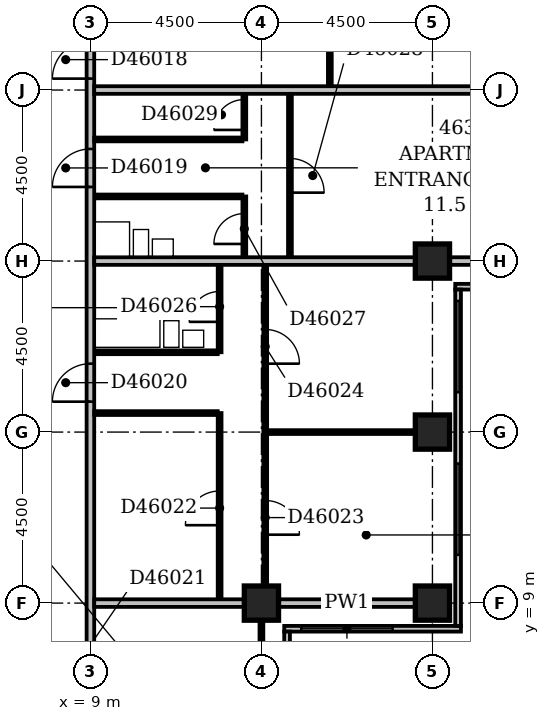
"""IFC4 building model, lengths in metres.
Left out: names, types, materials, properties, quantities, classifications, styles, units other than length and angle.
Written with IfcOpenShell. Run it as: python <this file> out.ifc"""

import sys

from ifc_helpers import new_model, si_unit, direction, frame, frame_2d, origin, origin_2d, place, context, subcontext, project, spatial, rectangle, extrude, element, fill, save


model = new_model("IFC4")
c1 = context("Model", 3, precision=1e-05, world=origin(), true_north=direction((0.0, 1.0)))
c2 = subcontext(c1, "Body", "Model", "MODEL_VIEW")
j1 = project(units=[si_unit("LENGTHUNIT", "METRE"), si_unit("PLANEANGLEUNIT", "RADIAN")], contexts=[c1])
p1 = place(None, origin())
s1 = spatial("IfcSite", under=j1, at=p1, CompositionType="ELEMENT")
p2 = place(p1, origin())
s2 = spatial("IfcBuilding", under=s1, at=p2, CompositionType="ELEMENT")
p3 = place(p2, frame((0.0, 0.0, 182.6)))
s3 = spatial("IfcBuildingStorey", under=s2, at=p3, CompositionType="ELEMENT", Elevation=182.6)
for number, where, z_axis, x_axis in (
    (1, (13.5, 9.0, -0.3), (0.0, 0.0, 1.0), (1.0, 0.0, 0.0)),
    (2, (18.0, 9.0, -0.3), (0.0, 0.0, 1.0), (1.0, 0.0, 0.0)),
    (3, (18.0, 13.5, -0.3), (0.0, 0.0, 1.0), (1.0, 0.0, 0.0)),
    (4, (18.0, 18.0, -0.3), (0.0, 0.0, 1.0), (1.0, 0.0, 0.0)),
):
    element("IfcColumn", number, at=place(p3, frame(where, z_axis=z_axis, x_axis=x_axis)), inside=s3, PredefinedType="COLUMN", context=c2, shape_type="SweptSolid", body=[
        extrude(rectangle(XDim=0.9, YDim=0.9, at=origin_2d()), origin(), (0.0, 0.0, 1.0), 3.55),
    ])
p4 = place(p3, frame((14.175, 3.9, 0.0), z_axis=(0.0, 0.0, 1.0), x_axis=(0.0, 1.0, 0.0)))
e5 = element("IfcWall", 5, at=p4, inside=s3, PredefinedType="STANDARD", context=c2, shape_type="SweptSolid", body=[
    extrude(rectangle(XDim=4.35, YDim=0.15, at=frame_2d((2.175, 0.0))), origin(), (0.0, 0.0, 1.0), 2.7),
])
p5 = place(p4, frame((1.65, 0.0, 0.6)))
e6 = element("IfcOpeningElement", 6, at=p5, cuts=e5, PredefinedType="OPENING", context=c2, shape_type="SweptSolid", body=[
    extrude(rectangle(XDim=2.4, YDim=1.8, at=frame_2d((1.2, 0.9))), frame((0.0, 0.087, 0.0), z_axis=(0.0, -1.0, 0.0), x_axis=(1.0, 0.0, 0.0)), (0.0, 0.0, 1.0), 0.174),
])
p6 = place(p3, frame((14.1, 8.325, 0.0), z_axis=(0.0, 0.0, 1.0), x_axis=(1.0, 0.0, 0.0)))
e7 = element("IfcWall", 7, at=p6, inside=s3, PredefinedType="STANDARD", context=c2, shape_type="SweptSolid", body=[
    extrude(rectangle(XDim=4.65, YDim=0.15, at=frame_2d((2.325, 0.0))), origin(), (0.0, 0.0, 1.0), 2.7),
])
p7 = place(p6, frame((0.45, 0.0, 0.6)))
e8 = element("IfcOpeningElement", 8, at=p7, cuts=e7, PredefinedType="OPENING", context=c2, shape_type="SweptSolid", body=[
    extrude(rectangle(XDim=2.4, YDim=1.8, at=frame_2d((1.2, 0.9))), frame((0.0, 0.087, 0.0), z_axis=(0.0, -1.0, 0.0), x_axis=(1.0, 0.0, 0.0)), (0.0, 0.0, 1.0), 0.174),
])
p8 = place(p3, frame((18.675, 8.4, 0.0), z_axis=(0.0, 0.0, 1.0), x_axis=(0.0, 1.0, 0.0)))
e9 = element("IfcWall", 9, at=p8, inside=s3, PredefinedType="STANDARD", context=c2, shape_type="SweptSolid", body=[
    extrude(rectangle(XDim=8.85, YDim=0.15, at=frame_2d((4.425, 0.0))), origin(), (0.0, 0.0, 1.0), 2.7),
])
p9 = place(p8, frame((1.871, 0.0, 0.6)))
e10 = element("IfcOpeningElement", 10, at=p9, cuts=e9, PredefinedType="OPENING", context=c2, shape_type="SweptSolid", body=[
    extrude(rectangle(XDim=2.4, YDim=1.8, at=frame_2d((1.2, 0.9))), frame((0.0, 0.087, 0.0), z_axis=(0.0, -1.0, 0.0), x_axis=(1.0, 0.0, 0.0)), (0.0, 0.0, 1.0), 0.174),
])
p10 = place(p8, frame((6.15, 0.0, 0.6)))
e11 = element("IfcOpeningElement", 11, at=p10, cuts=e9, PredefinedType="OPENING", context=c2, shape_type="SweptSolid", body=[
    extrude(rectangle(XDim=2.4, YDim=1.8, at=frame_2d((1.2, 0.9))), frame((0.0, 0.087, 0.0), z_axis=(0.0, -1.0, 0.0), x_axis=(1.0, 0.0, 0.0)), (0.0, 0.0, 1.0), 0.174),
])
p11 = place(p3, frame((18.6, 17.325, 0.0), z_axis=(0.0, 0.0, 1.0), x_axis=(1.0, 0.0, 0.0)))
e12 = element("IfcWall", 12, at=p11, inside=s3, PredefinedType="STANDARD", context=c2, shape_type="SweptSolid", body=[
    extrude(rectangle(XDim=4.65, YDim=0.15, at=frame_2d((2.325, 0.0))), origin(), (0.0, 0.0, 1.0), 2.7),
])
p12 = place(p11, frame((0.45, 0.0, 0.6)))
e13 = element("IfcOpeningElement", 13, at=p12, cuts=e12, PredefinedType="OPENING", context=c2, shape_type="SweptSolid", body=[
    extrude(rectangle(XDim=2.4, YDim=1.8, at=frame_2d((1.2, 0.9))), frame((0.0, 0.087, 0.0), z_axis=(0.0, -1.0, 0.0), x_axis=(1.0, 0.0, 0.0)), (0.0, 0.0, 1.0), 0.174),
])
p13 = place(p3, frame((13.5, 4.95, 0.0), z_axis=(0.0, 0.0, 1.0), x_axis=(0.0, 1.0, 0.0)))
e14 = element("IfcWall", 14, at=p13, inside=s3, PredefinedType="PARTITIONING", context=c2, shape_type="SweptSolid", body=[
    extrude(rectangle(XDim=3.6, YDim=0.1, at=frame_2d((1.8, 0.0))), origin(), (0.0, 0.0, 1.0), 2.7),
])
p14 = place(p3, frame((9.0, 5.0, 0.0), z_axis=(0.0, 0.0, 1.0), x_axis=(0.0, 1.0, 0.0)))
e15 = element("IfcWall", 15, at=p14, inside=s3, PredefinedType="PARTITIONING", context=c2, shape_type="SweptSolid", body=[
    extrude(rectangle(XDim=31.0, YDim=0.2, at=frame_2d((15.5, 0.0))), origin(), (0.0, 0.0, 1.0), 3.25),
])
p15 = place(p14, frame((17.8, 0.0, 0.0)))
e16 = element("IfcOpeningElement", 16, at=p15, cuts=e15, PredefinedType="OPENING", context=c2, shape_type="SweptSolid", body=[
    extrude(rectangle(XDim=1.0, YDim=2.1, at=frame_2d((0.5, 1.05))), frame((0.0, 0.112, 0.0), z_axis=(0.0, -1.0, 0.0), x_axis=(1.0, 0.0, 0.0)), (0.0, 0.0, 1.0), 0.224),
])
p16 = place(p14, frame((14.95, 0.0, 0.0)))
e17 = element("IfcOpeningElement", 17, at=p16, cuts=e15, PredefinedType="OPENING", context=c2, shape_type="SweptSolid", body=[
    extrude(rectangle(XDim=1.0, YDim=2.1, at=frame_2d((0.5, 1.05))), frame((0.0, 0.112, 0.0), z_axis=(0.0, -1.0, 0.0), x_axis=(1.0, 0.0, 0.0)), (0.0, 0.0, 1.0), 0.224),
])
p17 = place(p14, frame((9.3, 0.0, 0.0)))
e18 = element("IfcOpeningElement", 18, at=p17, cuts=e15, PredefinedType="OPENING", context=c2, shape_type="SweptSolid", body=[
    extrude(rectangle(XDim=1.0, YDim=2.1, at=frame_2d((0.5, 1.05))), frame((0.0, 0.112, 0.0), z_axis=(0.0, -1.0, 0.0), x_axis=(1.0, 0.0, 0.0)), (0.0, 0.0, 1.0), 0.224),
])
p18 = place(p14, frame((1.5, 0.0, 0.0)))
e19 = element("IfcOpeningElement", 19, at=p18, cuts=e15, PredefinedType="OPENING", context=c2, shape_type="SweptSolid", body=[
    extrude(rectangle(XDim=0.9, YDim=2.1, at=frame_2d((0.45, 1.05))), frame((0.0, 0.112, 0.0), z_axis=(0.0, -1.0, 0.0), x_axis=(1.0, 0.0, 0.0)), (0.0, 0.0, 1.0), 0.224),
])
p19 = place(p3, frame((9.1, 9.0, 0.0), z_axis=(0.0, 0.0, 1.0), x_axis=(1.0, 0.0, 0.0)))
e20 = element("IfcWall", 20, at=p19, inside=s3, PredefinedType="PARTITIONING", context=c2, shape_type="SweptSolid", body=[
    extrude(rectangle(XDim=3.95, YDim=0.2, at=frame_2d((1.975, 0.0))), origin(), (0.0, 0.0, 1.0), 3.25),
])
p20 = place(p3, frame((13.95, 9.0, 0.0), z_axis=(0.0, 0.0, 1.0), x_axis=(1.0, 0.0, 0.0)))
e21 = element("IfcWall", 21, at=p20, inside=s3, PredefinedType="PARTITIONING", context=c2, shape_type="SweptSolid", body=[
    extrude(rectangle(XDim=3.6, YDim=0.2, at=frame_2d((1.8, 0.0))), origin(), (0.0, 0.0, 1.0), 2.7),
])
p21 = place(p3, frame((12.4, 9.1, 0.0), z_axis=(0.0, 0.0, 1.0), x_axis=(0.0, 1.0, 0.0)))
e22 = element("IfcWall", 22, at=p21, inside=s3, PredefinedType="PARTITIONING", context=c2, shape_type="SweptSolid", body=[
    extrude(rectangle(XDim=4.9, YDim=0.1, at=frame_2d((2.45, 0.0))), origin(), (0.0, 0.0, 1.0), 3.25),
])
p22 = place(p21, frame((1.95, 0.0, 0.0)))
e23 = element("IfcOpeningElement", 23, at=p22, cuts=e22, PredefinedType="OPENING", context=c2, shape_type="SweptSolid", body=[
    extrude(rectangle(XDim=0.9, YDim=2.1, at=frame_2d((0.45, 1.05))), frame((0.0, 0.062, 0.0), z_axis=(0.0, -1.0, 0.0), x_axis=(1.0, 0.0, 0.0)), (0.0, 0.0, 1.0), 0.124),
])
p23 = place(p3, frame((13.6, 9.45, 0.0), z_axis=(0.0, 0.0, 1.0), x_axis=(0.0, 1.0, 0.0)))
e24 = element("IfcWall", 24, at=p23, inside=s3, PredefinedType="PARTITIONING", context=c2, shape_type="SweptSolid", body=[
    extrude(rectangle(XDim=8.45, YDim=0.1, at=frame_2d((4.225, 0.0))), origin(), (0.0, 0.0, 1.0), 3.25),
])
p24 = place(p23, frame((1.35, 0.0, 0.0)))
e25 = element("IfcOpeningElement", 25, at=p24, cuts=e24, PredefinedType="OPENING", context=c2, shape_type="SweptSolid", body=[
    extrude(rectangle(XDim=0.9, YDim=2.1, at=frame_2d((0.45, 1.05))), frame((0.0, 0.062, 0.0), z_axis=(0.0, -1.0, 0.0), x_axis=(1.0, 0.0, 0.0)), (0.0, 0.0, 1.0), 0.124),
])
p25 = place(p23, frame((5.85, 0.0, 0.0)))
e26 = element("IfcOpeningElement", 26, at=p25, cuts=e24, PredefinedType="OPENING", context=c2, shape_type="SweptSolid", body=[
    extrude(rectangle(XDim=0.9, YDim=2.1, at=frame_2d((0.45, 1.05))), frame((0.0, 0.062, 0.0), z_axis=(0.0, -1.0, 0.0), x_axis=(1.0, 0.0, 0.0)), (0.0, 0.0, 1.0), 0.124),
])
p26 = place(p3, frame((13.65, 13.5, 0.0), z_axis=(0.0, 0.0, 1.0), x_axis=(1.0, 0.0, 0.0)))
e27 = element("IfcWall", 27, at=p26, inside=s3, PredefinedType="PARTITIONING", context=c2, shape_type="SweptSolid", body=[
    extrude(rectangle(XDim=3.9, YDim=0.1, at=frame_2d((1.95, 0.0))), origin(), (0.0, 0.0, 1.0), 3.25),
])
p27 = place(p3, frame((9.1, 14.0, 0.0), z_axis=(0.0, 0.0, 1.0), x_axis=(1.0, 0.0, 0.0)))
e28 = element("IfcWall", 28, at=p27, inside=s3, PredefinedType="PARTITIONING", context=c2, shape_type="SweptSolid", body=[
    extrude(rectangle(XDim=3.25, YDim=0.1, at=frame_2d((1.625, 0.0))), origin(), (0.0, 0.0, 1.0), 3.25),
])
p28 = place(p3, frame((9.1, 15.6, 0.0), z_axis=(0.0, 0.0, 1.0), x_axis=(1.0, 0.0, 0.0)))
e29 = element("IfcWall", 29, at=p28, inside=s3, PredefinedType="PLUMBINGWALL", context=c2, shape_type="SweptSolid", body=[
    extrude(rectangle(XDim=3.25, YDim=0.1, at=frame_2d((1.625, 0.0))), origin(), (0.0, 0.0, 1.0), 3.25),
])
p29 = place(p3, frame((12.4, 15.6, 0.0), z_axis=(0.0, 0.0, 1.0), x_axis=(0.0, 1.0, 0.0)))
e30 = element("IfcWall", 30, at=p29, inside=s3, PredefinedType="PARTITIONING", context=c2, shape_type="SweptSolid", body=[
    extrude(rectangle(XDim=2.3, YDim=0.1, at=frame_2d((1.15, 0.0))), origin(), (0.0, 0.0, 1.0), 3.25),
])
p30 = place(p29, frame((0.8, 0.0, 0.0)))
e31 = element("IfcOpeningElement", 31, at=p30, cuts=e30, PredefinedType="OPENING", context=c2, shape_type="SweptSolid", body=[
    extrude(rectangle(XDim=0.8, YDim=2.1, at=frame_2d((0.4, 1.05))), frame((0.0, 0.062, 0.0), z_axis=(0.0, -1.0, 0.0), x_axis=(1.0, 0.0, 0.0)), (0.0, 0.0, 1.0), 0.124),
])
p31 = place(p3, frame((9.1, 18.0, 0.0), z_axis=(0.0, 0.0, 1.0), x_axis=(1.0, 0.0, 0.0)))
e32 = element("IfcWall", 32, at=p31, inside=s3, PredefinedType="PARTITIONING", context=c2, shape_type="SweptSolid", body=[
    extrude(rectangle(XDim=8.45, YDim=0.2, at=frame_2d((4.225, 0.0))), origin(), (0.0, 0.0, 1.0), 2.55),
])
p32 = place(p3, frame((18.45, 18.0, 0.0), z_axis=(0.0, 0.0, 1.0), x_axis=(1.0, 0.0, 0.0)))
e33 = element("IfcWall", 33, at=p32, inside=s3, PredefinedType="PARTITIONING", context=c2, shape_type="SweptSolid", body=[
    extrude(rectangle(XDim=3.6, YDim=0.2, at=frame_2d((1.8, 0.0))), origin(), (0.0, 0.0, 1.0), 2.7),
])
p33 = place(p3, frame((13.05, 18.1, 0.0), z_axis=(0.0, 0.0, 1.0), x_axis=(0.0, 1.0, 0.0)))
e34 = element("IfcWall", 34, at=p33, inside=s3, PredefinedType="PARTITIONING", context=c2, shape_type="SweptSolid", body=[
    extrude(rectangle(XDim=1.6, YDim=0.1, at=frame_2d((0.8, 0.0))), origin(), (0.0, 0.0, 1.0), 3.25),
])
p34 = place(p33, frame((0.35, 0.0, 0.0)))
e35 = element("IfcOpeningElement", 35, at=p34, cuts=e34, PredefinedType="OPENING", context=c2, shape_type="SweptSolid", body=[
    extrude(rectangle(XDim=0.8, YDim=2.1, at=frame_2d((0.4, 1.05))), frame((0.0, 0.062, 0.0), z_axis=(0.0, -1.0, 0.0), x_axis=(1.0, 0.0, 0.0)), (0.0, 0.0, 1.0), 0.124),
])
p35 = place(p3, frame((14.25, 18.1, 0.0), z_axis=(0.0, 0.0, 1.0), x_axis=(0.0, 1.0, 0.0)))
e36 = element("IfcWall", 36, at=p35, inside=s3, PredefinedType="PARTITIONING", context=c2, shape_type="SweptSolid", body=[
    extrude(rectangle(XDim=4.3, YDim=0.1, at=frame_2d((2.15, 0.0))), origin(), (0.0, 0.0, 1.0), 3.25),
])
p36 = place(p35, frame((1.7, 0.0, 0.0)))
e37 = element("IfcOpeningElement", 37, at=p36, cuts=e36, PredefinedType="OPENING", context=c2, shape_type="SweptSolid", body=[
    extrude(rectangle(XDim=0.9, YDim=2.1, at=frame_2d((0.45, 1.05))), frame((0.0, 0.062, 0.0), z_axis=(0.0, -1.0, 0.0), x_axis=(1.0, 0.0, 0.0)), (0.0, 0.0, 1.0), 0.124),
])
p37 = place(p3, frame((9.1, 19.7, 0.0), z_axis=(0.0, 0.0, 1.0), x_axis=(1.0, 0.0, 0.0)))
e38 = element("IfcWall", 38, at=p37, inside=s3, PredefinedType="PLUMBINGWALL", context=c2, shape_type="SweptSolid", body=[
    extrude(rectangle(XDim=3.9, YDim=0.1, at=frame_2d((1.95, 0.0))), origin(), (0.0, 0.0, 1.0), 3.25),
])
p38 = place(p3, frame((9.1, 21.2, 0.0), z_axis=(0.0, 0.0, 1.0), x_axis=(1.0, 0.0, 0.0)))
e39 = element("IfcWall", 39, at=p38, inside=s3, PredefinedType="PARTITIONING", context=c2, shape_type="SweptSolid", body=[
    extrude(rectangle(XDim=3.9, YDim=0.1, at=frame_2d((1.95, 0.0))), origin(), (0.0, 0.0, 1.0), 3.25),
])
p39 = place(p3, frame((13.05, 21.2, 0.0), z_axis=(0.0, 0.0, 1.0), x_axis=(0.0, 1.0, 0.0)))
e40 = element("IfcWall", 40, at=p39, inside=s3, PredefinedType="PARTITIONING", context=c2, shape_type="SweptSolid", body=[
    extrude(rectangle(XDim=1.2, YDim=0.1, at=frame_2d((0.6, 0.0))), origin(), (0.0, 0.0, 1.0), 3.25),
])
p40 = place(p39, frame((0.25, 0.0, 0.0)))
e41 = element("IfcOpeningElement", 41, at=p40, cuts=e40, PredefinedType="OPENING", context=c2, shape_type="SweptSolid", body=[
    extrude(rectangle(XDim=0.8, YDim=2.1, at=frame_2d((0.4, 1.05))), frame((0.0, 0.062, 0.0), z_axis=(0.0, -1.0, 0.0), x_axis=(1.0, 0.0, 0.0)), (0.0, 0.0, 1.0), 0.124),
])
p41 = place(p3, frame((9.1, 22.5, 0.0), z_axis=(0.0, 0.0, 1.0), x_axis=(1.0, 0.0, 0.0)))
e42 = element("IfcWall", 42, at=p41, inside=s3, PredefinedType="PARTITIONING", context=c2, shape_type="SweptSolid", body=[
    extrude(rectangle(XDim=12.95, YDim=0.2, at=frame_2d((6.475, 0.0))), origin(), (0.0, 0.0, 1.0), 3.25),
])
p42 = place(p3, frame((15.3, 22.6, 0.0), z_axis=(0.0, 0.0, 1.0), x_axis=(0.0, 1.0, 0.0)))
e43 = element("IfcWall", 43, at=p42, inside=s3, PredefinedType="PARTITIONING", context=c2, shape_type="SweptSolid", body=[
    extrude(rectangle(XDim=13.3, YDim=0.1, at=frame_2d((6.65, 0.0))), origin(), (0.0, 0.0, 1.0), 3.25),
])
p43 = place(p42, frame((1.7, 0.0, 0.0)))
e44 = element("IfcOpeningElement", 44, at=p43, cuts=e43, PredefinedType="OPENING", context=c2, shape_type="SweptSolid", body=[
    extrude(rectangle(XDim=0.9, YDim=2.1, at=frame_2d((0.45, 1.05))), frame((0.0, 0.062, 0.0), z_axis=(0.0, -1.0, 0.0), x_axis=(1.0, 0.0, 0.0)), (0.0, 0.0, 1.0), 0.124),
])
p44 = place(p42, frame((6.2, 0.0, 0.0)))
e45 = element("IfcOpeningElement", 45, at=p44, cuts=e43, PredefinedType="OPENING", context=c2, shape_type="SweptSolid", body=[
    extrude(rectangle(XDim=0.9, YDim=2.1, at=frame_2d((0.45, 1.05))), frame((0.0, 0.062, 0.0), z_axis=(0.0, -1.0, 0.0), x_axis=(1.0, 0.0, 0.0)), (0.0, 0.0, 1.0), 0.124),
])
p45 = place(p42, frame((10.7, 0.0, 0.0)))
e46 = element("IfcOpeningElement", 46, at=p45, cuts=e43, PredefinedType="OPENING", context=c2, shape_type="SweptSolid", body=[
    extrude(rectangle(XDim=0.9, YDim=2.1, at=frame_2d((0.45, 1.05))), frame((0.0, 0.062, 0.0), z_axis=(0.0, -1.0, 0.0), x_axis=(1.0, 0.0, 0.0)), (0.0, 0.0, 1.0), 0.124),
])
p46 = place(p7, origin())
e47 = element("IfcWindow", 47, at=p46, inside=s3, PartitioningType="SINGLE_PANEL", PredefinedType="WINDOW", context=c2, shape_type="SweptSolid", body=[
    extrude(rectangle(XDim=2.4, YDim=1.8, at=frame_2d((1.2, 0.9))), frame((0.0, 0.03, 0.0), z_axis=(0.0, -1.0, 0.0), x_axis=(1.0, 0.0, 0.0)), (0.0, 0.0, 1.0), 0.06),
])
fill(e8, e47)
p47 = place(p9, origin())
e48 = element("IfcWindow", 48, at=p47, inside=s3, PartitioningType="SINGLE_PANEL", PredefinedType="WINDOW", context=c2, shape_type="SweptSolid", body=[
    extrude(rectangle(XDim=2.4, YDim=1.8, at=frame_2d((1.2, 0.9))), frame((0.0, 0.03, 0.0), z_axis=(0.0, -1.0, 0.0), x_axis=(1.0, 0.0, 0.0)), (0.0, 0.0, 1.0), 0.06),
])
fill(e10, e48)
p48 = place(p10, origin())
e49 = element("IfcWindow", 49, at=p48, inside=s3, PartitioningType="SINGLE_PANEL", PredefinedType="WINDOW", context=c2, shape_type="SweptSolid", body=[
    extrude(rectangle(XDim=2.4, YDim=1.8, at=frame_2d((1.2, 0.9))), frame((0.0, 0.03, 0.0), z_axis=(0.0, -1.0, 0.0), x_axis=(1.0, 0.0, 0.0)), (0.0, 0.0, 1.0), 0.06),
])
fill(e11, e49)
p49 = place(p15, origin())
e50 = element("IfcDoor", 50, at=p49, inside=s3, OperationType="SINGLE_SWING_LEFT", PredefinedType="DOOR", context=c2, shape_type="SweptSolid", body=[
    extrude(rectangle(XDim=1.0, YDim=2.1, at=frame_2d((0.5, 1.05))), frame((0.0, 0.025, 0.0), z_axis=(0.0, -1.0, 0.0), x_axis=(1.0, 0.0, 0.0)), (0.0, 0.0, 1.0), 0.05),
])
fill(e16, e50)
p50 = place(p16, origin())
e51 = element("IfcDoor", 51, at=p50, inside=s3, OperationType="SINGLE_SWING_LEFT", PredefinedType="DOOR", context=c2, shape_type="SweptSolid", body=[
    extrude(rectangle(XDim=1.0, YDim=2.1, at=frame_2d((0.5, 1.05))), frame((0.0, 0.025, 0.0), z_axis=(0.0, -1.0, 0.0), x_axis=(1.0, 0.0, 0.0)), (0.0, 0.0, 1.0), 0.05),
])
fill(e17, e51)
p51 = place(p17, origin())
e52 = element("IfcDoor", 52, at=p51, inside=s3, OperationType="SINGLE_SWING_LEFT", PredefinedType="DOOR", context=c2, shape_type="SweptSolid", body=[
    extrude(rectangle(XDim=1.0, YDim=2.1, at=frame_2d((0.5, 1.05))), frame((0.0, 0.025, 0.0), z_axis=(0.0, -1.0, 0.0), x_axis=(1.0, 0.0, 0.0)), (0.0, 0.0, 1.0), 0.05),
])
fill(e18, e52)
p52 = place(p22, origin())
e53 = element("IfcDoor", 53, at=p52, inside=s3, OperationType="SINGLE_SWING_LEFT", PredefinedType="DOOR", context=c2, shape_type="SweptSolid", body=[
    extrude(rectangle(XDim=0.9, YDim=2.1, at=frame_2d((0.45, 1.05))), frame((0.0, 0.025, 0.0), z_axis=(0.0, -1.0, 0.0), x_axis=(1.0, 0.0, 0.0)), (0.0, 0.0, 1.0), 0.05),
])
fill(e23, e53)
p53 = place(p24, frame((0.9, 0.0, 0.0), z_axis=(0.0, 0.0, 1.0), x_axis=(-1.0, 0.0, 0.0)))
e54 = element("IfcDoor", 54, at=p53, inside=s3, OperationType="SINGLE_SWING_RIGHT", PredefinedType="DOOR", context=c2, shape_type="SweptSolid", body=[
    extrude(rectangle(XDim=0.9, YDim=2.1, at=frame_2d((0.45, 1.05))), frame((0.0, 0.025, 0.0), z_axis=(0.0, -1.0, 0.0), x_axis=(1.0, 0.0, 0.0)), (0.0, 0.0, 1.0), 0.05),
])
fill(e25, e54)
p54 = place(p25, frame((0.9, 0.0, 0.0), z_axis=(0.0, 0.0, 1.0), x_axis=(-1.0, 0.0, 0.0)))
e55 = element("IfcDoor", 55, at=p54, inside=s3, OperationType="SINGLE_SWING_RIGHT", PredefinedType="DOOR", context=c2, shape_type="SweptSolid", body=[
    extrude(rectangle(XDim=0.9, YDim=2.1, at=frame_2d((0.45, 1.05))), frame((0.0, 0.025, 0.0), z_axis=(0.0, -1.0, 0.0), x_axis=(1.0, 0.0, 0.0)), (0.0, 0.0, 1.0), 0.05),
])
fill(e26, e55)
p55 = place(p30, origin())
e56 = element("IfcDoor", 56, at=p55, inside=s3, OperationType="SINGLE_SWING_LEFT", PredefinedType="DOOR", context=c2, shape_type="SweptSolid", body=[
    extrude(rectangle(XDim=0.8, YDim=2.1, at=frame_2d((0.4, 1.05))), frame((0.0, 0.025, 0.0), z_axis=(0.0, -1.0, 0.0), x_axis=(1.0, 0.0, 0.0)), (0.0, 0.0, 1.0), 0.05),
])
fill(e31, e56)
p56 = place(p34, origin())
e57 = element("IfcDoor", 57, at=p56, inside=s3, OperationType="SINGLE_SWING_LEFT", PredefinedType="DOOR", context=c2, shape_type="SweptSolid", body=[
    extrude(rectangle(XDim=0.8, YDim=2.1, at=frame_2d((0.4, 1.05))), frame((0.0, 0.025, 0.0), z_axis=(0.0, -1.0, 0.0), x_axis=(1.0, 0.0, 0.0)), (0.0, 0.0, 1.0), 0.05),
])
fill(e35, e57)
p57 = place(p36, frame((0.9, 0.0, 0.0), z_axis=(0.0, 0.0, 1.0), x_axis=(-1.0, 0.0, 0.0)))
e58 = element("IfcDoor", 58, at=p57, inside=s3, OperationType="SINGLE_SWING_RIGHT", PredefinedType="DOOR", context=c2, shape_type="SweptSolid", body=[
    extrude(rectangle(XDim=0.9, YDim=2.1, at=frame_2d((0.45, 1.05))), frame((0.0, 0.025, 0.0), z_axis=(0.0, -1.0, 0.0), x_axis=(1.0, 0.0, 0.0)), (0.0, 0.0, 1.0), 0.05),
])
fill(e37, e58)
p58 = place(p40, origin())
e59 = element("IfcDoor", 59, at=p58, inside=s3, OperationType="SINGLE_SWING_LEFT", PredefinedType="DOOR", context=c2, shape_type="SweptSolid", body=[
    extrude(rectangle(XDim=0.8, YDim=2.1, at=frame_2d((0.4, 1.05))), frame((0.0, 0.025, 0.0), z_axis=(0.0, -1.0, 0.0), x_axis=(1.0, 0.0, 0.0)), (0.0, 0.0, 1.0), 0.05),
])
fill(e41, e59)
save(model, sys.argv[1])
